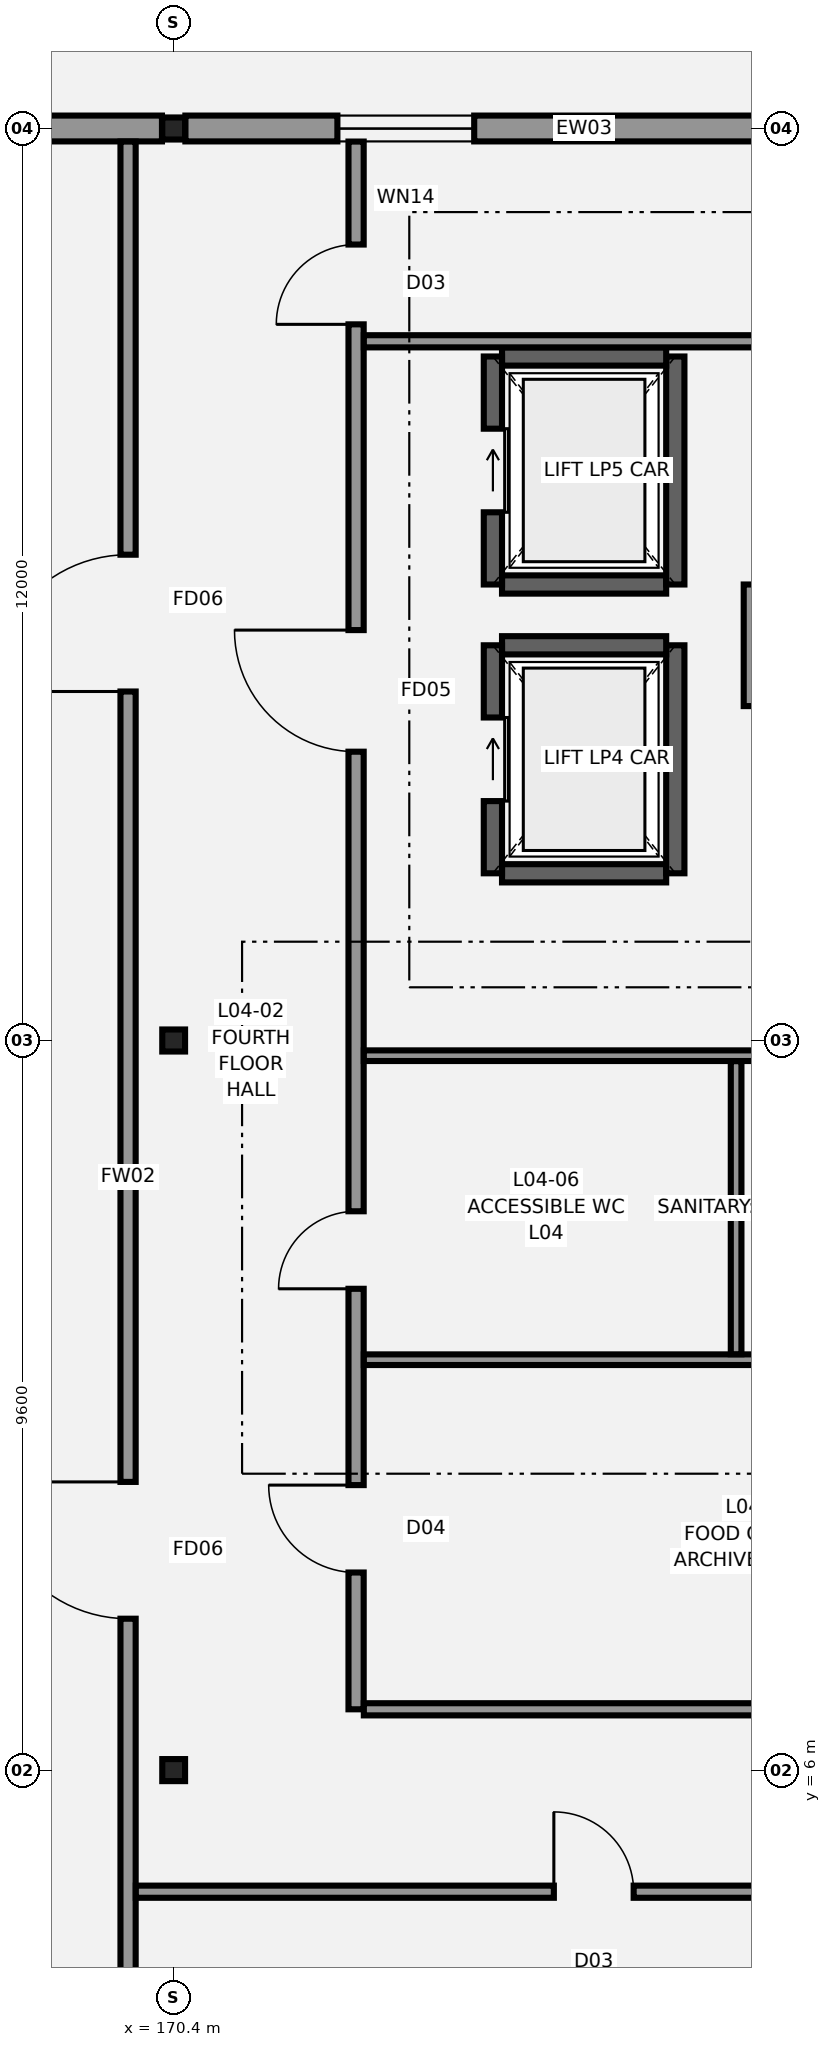
"""IFC4 building model, lengths in metres.
Left out: names, types, materials, properties, quantities, classifications, styles, units other than length and angle.
Written with IfcOpenShell. Run it as: python <this file> out.ifc"""

import sys

from ifc_helpers import new_model, si_unit, direction, frame, frame_2d, origin, origin_2d, place, context, subcontext, project, spatial, rectangle, i_section, extrude, element, fill, save


model = new_model("IFC4")
c1 = context("Model", 3, precision=1e-05, world=origin(), true_north=direction((0.0, 1.0)))
c2 = subcontext(c1, "Body", "Model", "MODEL_VIEW")
j1 = project(units=[si_unit("LENGTHUNIT", "METRE"), si_unit("PLANEANGLEUNIT", "RADIAN")], contexts=[c1])
p1 = place(None, origin())
s1 = spatial("IfcSite", under=j1, at=p1, CompositionType="ELEMENT")
p2 = place(p1, origin())
s2 = spatial("IfcBuilding", under=s1, at=p2, CompositionType="ELEMENT")
p3 = place(p2, frame((0.0, 0.0, 18.6)))
s3 = spatial("IfcBuildingStorey", under=s2, at=p3, CompositionType="ELEMENT", Elevation=18.6)
for number, where, z_axis, x_axis in (
    (1, (170.4, 6.0, 0.0), (0.0, 0.0, 1.0), (1.0, 0.0, 0.0)),
    (2, (170.4, 15.6, 0.0), (0.0, 0.0, 1.0), (1.0, 0.0, 0.0)),
    (3, (170.4, 27.6, 0.0), (0.0, 0.0, 1.0), (1.0, 0.0, 0.0)),
):
    element("IfcColumn", number, at=place(p3, frame(where, z_axis=z_axis, x_axis=x_axis)), inside=s3, PredefinedType="COLUMN", context=c2, shape_type="SweptSolid", body=[
        extrude(i_section(OverallWidth=0.3, OverallDepth=0.29, WebThickness=0.009, FlangeThickness=0.014, FilletRadius=0.027, at=origin_2d()), origin(), (0.0, 0.0, 1.0), 2.9),
    ])
p4 = place(p3, frame((174.72, 17.8, 0.0), z_axis=(0.0, 0.0, 1.0), x_axis=(1.0, 0.0, 0.0)))
e4 = element("IfcWall", 4, at=p4, inside=s3, PredefinedType="SHEAR", context=c2, shape_type="SweptSolid", body=[
    extrude(rectangle(XDim=2.16, YDim=0.24, at=frame_2d((1.08, 0.0))), origin(), (0.0, 0.0, 1.0), 2.7),
])
p5 = place(p3, frame((177.0, 17.8, 0.0), z_axis=(0.0, 0.0, 1.0), x_axis=(0.0, 1.0, 0.0)))
e5 = element("IfcWall", 5, at=p5, inside=s3, PredefinedType="SHEAR", context=c2, shape_type="SweptSolid", body=[
    extrude(rectangle(XDim=3.0, YDim=0.24, at=frame_2d((1.5, 0.0))), origin(), (0.0, 0.0, 1.0), 2.7),
])
p6 = place(p3, frame((176.88, 20.8, 0.0), z_axis=(0.0, 0.0, 1.0), x_axis=(-1.0, 0.0, 0.0)))
e6 = element("IfcWall", 6, at=p6, inside=s3, PredefinedType="SHEAR", context=c2, shape_type="SweptSolid", body=[
    extrude(rectangle(XDim=2.16, YDim=0.24, at=frame_2d((1.08, 0.0))), origin(), (0.0, 0.0, 1.0), 2.7),
])
p7 = place(p3, frame((174.6, 20.8, 0.0), z_axis=(0.0, 0.0, 1.0), x_axis=(0.0, -1.0, 0.0)))
e7 = element("IfcWall", 7, at=p7, inside=s3, PredefinedType="SHEAR", context=c2, shape_type="SweptSolid", body=[
    extrude(rectangle(XDim=3.0, YDim=0.24, at=frame_2d((1.5, 0.0))), origin(), (0.0, 0.0, 1.0), 2.7),
])
p8 = place(p7, frame((0.95, 0.0, 0.0)))
e8 = element("IfcOpeningElement", 8, at=p8, cuts=e7, PredefinedType="OPENING", context=c2, shape_type="SweptSolid", body=[
    extrude(rectangle(XDim=1.1, YDim=2.1, at=frame_2d((0.55, 1.05))), frame((0.0, 0.13, 0.0), z_axis=(0.0, -1.0, 0.0), x_axis=(1.0, 0.0, 0.0)), (0.0, 0.0, 1.0), 0.26),
])
p9 = place(p3, frame((174.72, 21.6, 0.0), z_axis=(0.0, 0.0, 1.0), x_axis=(1.0, 0.0, 0.0)))
e9 = element("IfcWall", 9, at=p9, inside=s3, PredefinedType="SHEAR", context=c2, shape_type="SweptSolid", body=[
    extrude(rectangle(XDim=2.16, YDim=0.24, at=frame_2d((1.08, 0.0))), origin(), (0.0, 0.0, 1.0), 2.7),
])
p10 = place(p3, frame((177.0, 21.6, 0.0), z_axis=(0.0, 0.0, 1.0), x_axis=(0.0, 1.0, 0.0)))
e10 = element("IfcWall", 10, at=p10, inside=s3, PredefinedType="SHEAR", context=c2, shape_type="SweptSolid", body=[
    extrude(rectangle(XDim=3.0, YDim=0.24, at=frame_2d((1.5, 0.0))), origin(), (0.0, 0.0, 1.0), 2.7),
])
p11 = place(p3, frame((176.88, 24.6, 0.0), z_axis=(0.0, 0.0, 1.0), x_axis=(-1.0, 0.0, 0.0)))
e11 = element("IfcWall", 11, at=p11, inside=s3, PredefinedType="SHEAR", context=c2, shape_type="SweptSolid", body=[
    extrude(rectangle(XDim=2.16, YDim=0.24, at=frame_2d((1.08, 0.0))), origin(), (0.0, 0.0, 1.0), 2.7),
])
p12 = place(p3, frame((174.6, 24.6, 0.0), z_axis=(0.0, 0.0, 1.0), x_axis=(0.0, -1.0, 0.0)))
e12 = element("IfcWall", 12, at=p12, inside=s3, PredefinedType="SHEAR", context=c2, shape_type="SweptSolid", body=[
    extrude(rectangle(XDim=3.0, YDim=0.24, at=frame_2d((1.5, 0.0))), origin(), (0.0, 0.0, 1.0), 2.7),
])
p13 = place(p12, frame((0.95, 0.0, 0.0)))
e13 = element("IfcOpeningElement", 13, at=p13, cuts=e12, PredefinedType="OPENING", context=c2, shape_type="SweptSolid", body=[
    extrude(rectangle(XDim=1.1, YDim=2.1, at=frame_2d((0.55, 1.05))), frame((0.0, 0.13, 0.0), z_axis=(0.0, -1.0, 0.0), x_axis=(1.0, 0.0, 0.0)), (0.0, 0.0, 1.0), 0.26),
])
p14 = place(p3, frame((159.754, 27.6, 0.0), z_axis=(0.0, 0.0, 1.0), x_axis=(1.0, 0.0, 0.0)))
e14 = element("IfcWall", 14, at=p14, inside=s3, PredefinedType="STANDARD", context=c2, shape_type="SweptSolid", body=[
    extrude(rectangle(XDim=10.492, YDim=0.34, at=frame_2d((5.246, 0.0))), origin(), (0.0, 0.0, 1.0), 2.45),
])
p15 = place(p14, frame((2.6, 0.0, 0.0)))
e15 = element("IfcOpeningElement", 15, at=p15, cuts=e14, PredefinedType="OPENING", context=c2, shape_type="SweptSolid", body=[
    extrude(rectangle(XDim=1.5, YDim=2.3, at=frame_2d((0.75, 1.15))), frame((0.0, 0.18, 0.0), z_axis=(0.0, -1.0, 0.0), x_axis=(1.0, 0.0, 0.0)), (0.0, 0.0, 1.0), 0.36),
])
p16 = place(p3, frame((170.554, 27.6, 0.0), z_axis=(0.0, 0.0, 1.0), x_axis=(1.0, 0.0, 0.0)))
e16 = element("IfcWall", 16, at=p16, inside=s3, PredefinedType="STANDARD", context=c2, shape_type="SweptSolid", body=[
    extrude(rectangle(XDim=10.492, YDim=0.34, at=frame_2d((5.246, 0.0))), origin(), (0.0, 0.0, 1.0), 2.45),
])
p17 = place(p16, frame((2.0, 0.0, 0.8)))
e17 = element("IfcOpeningElement", 17, at=p17, cuts=e16, PredefinedType="OPENING", context=c2, shape_type="SweptSolid", body=[
    extrude(rectangle(XDim=1.8, YDim=1.4, at=frame_2d((0.9, 0.7))), frame((0.0, 0.18, 0.0), z_axis=(0.0, -1.0, 0.0), x_axis=(1.0, 0.0, 0.0)), (0.0, 0.0, 1.0), 0.36),
])
p18 = place(p3, frame((169.8, 0.192, 0.0), z_axis=(0.0, 0.0, 1.0), x_axis=(0.0, 1.0, 0.0)))
e18 = element("IfcWall", 18, at=p18, inside=s3, PredefinedType="PARTITIONING", context=c2, shape_type="SweptSolid", body=[
    extrude(rectangle(XDim=27.236, YDim=0.2, at=frame_2d((13.618, 0.0))), origin(), (0.0, 0.0, 1.0), 2.45),
])
p19 = place(p18, frame((7.8, 0.0, 0.0)))
e19 = element("IfcOpeningElement", 19, at=p19, cuts=e18, PredefinedType="OPENING", context=c2, shape_type="SweptSolid", body=[
    extrude(rectangle(XDim=1.8, YDim=2.2, at=frame_2d((0.9, 1.1))), frame((0.0, 0.11, 0.0), z_axis=(0.0, -1.0, 0.0), x_axis=(1.0, 0.0, 0.0)), (0.0, 0.0, 1.0), 0.22),
])
p20 = place(p18, frame((20.0, 0.0, 0.0)))
e20 = element("IfcOpeningElement", 20, at=p20, cuts=e18, PredefinedType="OPENING", context=c2, shape_type="SweptSolid", body=[
    extrude(rectangle(XDim=1.8, YDim=2.2, at=frame_2d((0.9, 1.1))), frame((0.0, 0.11, 0.0), z_axis=(0.0, -1.0, 0.0), x_axis=(1.0, 0.0, 0.0)), (0.0, 0.0, 1.0), 0.22),
])
p21 = place(p3, frame((169.902, 4.4, 0.0), z_axis=(0.0, 0.0, 1.0), x_axis=(1.0, 0.0, 0.0)))
e21 = element("IfcWall", 21, at=p21, inside=s3, PredefinedType="PARTITIONING", context=c2, shape_type="SweptSolid", body=[
    extrude(rectangle(XDim=17.616, YDim=0.16, at=frame_2d((8.808, 0.0))), origin(), (0.0, 0.0, 1.0), 2.45),
])
p22 = place(p21, frame((5.5, 0.0, 0.0)))
e22 = element("IfcOpeningElement", 22, at=p22, cuts=e21, PredefinedType="OPENING", context=c2, shape_type="SweptSolid", body=[
    extrude(rectangle(XDim=1.05, YDim=2.15, at=frame_2d((0.525, 1.075))), frame((0.0, 0.09, 0.0), z_axis=(0.0, -1.0, 0.0), x_axis=(1.0, 0.0, 0.0)), (0.0, 0.0, 1.0), 0.18),
])
p23 = place(p3, frame((172.8, 6.8, 0.0), z_axis=(0.0, 0.0, 1.0), x_axis=(0.0, 1.0, 0.0)))
e23 = element("IfcWall", 23, at=p23, inside=s3, PredefinedType="PARTITIONING", context=c2, shape_type="SweptSolid", body=[
    extrude(rectangle(XDim=20.628, YDim=0.2, at=frame_2d((10.314, 0.0))), origin(), (0.0, 0.0, 1.0), 2.45),
])
p24 = place(p23, frame((1.8, 0.0, 0.0)))
e24 = element("IfcOpeningElement", 24, at=p24, cuts=e23, PredefinedType="OPENING", context=c2, shape_type="SweptSolid", body=[
    extrude(rectangle(XDim=1.15, YDim=2.15, at=frame_2d((0.575, 1.075))), frame((0.0, 0.11, 0.0), z_axis=(0.0, -1.0, 0.0), x_axis=(1.0, 0.0, 0.0)), (0.0, 0.0, 1.0), 0.22),
])
p25 = place(p23, frame((5.533, 0.0, 0.0)))
e25 = element("IfcOpeningElement", 25, at=p25, cuts=e23, PredefinedType="OPENING", context=c2, shape_type="SweptSolid", body=[
    extrude(rectangle(XDim=1.02, YDim=2.12, at=frame_2d((0.51, 1.06))), frame((0.0, 0.11, 0.0), z_axis=(0.0, -1.0, 0.0), x_axis=(1.0, 0.0, 0.0)), (0.0, 0.0, 1.0), 0.22),
])
p26 = place(p23, frame((12.6, 0.0, 0.0)))
e26 = element("IfcOpeningElement", 26, at=p26, cuts=e23, PredefinedType="OPENING", context=c2, shape_type="SweptSolid", body=[
    extrude(rectangle(XDim=1.6, YDim=2.2, at=frame_2d((0.8, 1.1))), frame((0.0, 0.11, 0.0), z_axis=(0.0, -1.0, 0.0), x_axis=(1.0, 0.0, 0.0)), (0.0, 0.0, 1.0), 0.22),
])
p27 = place(p23, frame((18.223, 0.0, 0.0)))
e27 = element("IfcOpeningElement", 27, at=p27, cuts=e23, PredefinedType="OPENING", context=c2, shape_type="SweptSolid", body=[
    extrude(rectangle(XDim=1.05, YDim=2.15, at=frame_2d((0.525, 1.075))), frame((0.0, 0.11, 0.0), z_axis=(0.0, -1.0, 0.0), x_axis=(1.0, 0.0, 0.0)), (0.0, 0.0, 1.0), 0.22),
])
p28 = place(p3, frame((172.902, 6.8, 0.0), z_axis=(0.0, 0.0, 1.0), x_axis=(1.0, 0.0, 0.0)))
e28 = element("IfcWall", 28, at=p28, inside=s3, PredefinedType="PARTITIONING", context=c2, shape_type="SweptSolid", body=[
    extrude(rectangle(XDim=10.346, YDim=0.16, at=frame_2d((5.173, 0.0))), origin(), (0.0, 0.0, 1.0), 2.45),
])
p29 = place(p3, frame((172.902, 11.4, 0.0), z_axis=(0.0, 0.0, 1.0), x_axis=(1.0, 0.0, 0.0)))
e29 = element("IfcWall", 29, at=p29, inside=s3, PredefinedType="PARTITIONING", context=c2, shape_type="SweptSolid", body=[
    extrude(rectangle(XDim=10.346, YDim=0.14, at=frame_2d((5.173, 0.0))), origin(), (0.0, 0.0, 1.0), 2.45),
])
p30 = place(p3, frame((172.902, 15.4, 0.0), z_axis=(0.0, 0.0, 1.0), x_axis=(1.0, 0.0, 0.0)))
e30 = element("IfcWall", 30, at=p30, inside=s3, PredefinedType="PARTITIONING", context=c2, shape_type="SweptSolid", body=[
    extrude(rectangle(XDim=14.616, YDim=0.14, at=frame_2d((7.308, 0.0))), origin(), (0.0, 0.0, 1.0), 2.45),
])
p31 = place(p30, frame((6.0, 0.0, 0.0)))
e31 = element("IfcOpeningElement", 31, at=p31, cuts=e30, PredefinedType="OPENING", context=c2, shape_type="SweptSolid", body=[
    extrude(rectangle(XDim=0.95, YDim=2.1, at=frame_2d((0.475, 1.05))), frame((0.0, 0.08, 0.0), z_axis=(0.0, -1.0, 0.0), x_axis=(1.0, 0.0, 0.0)), (0.0, 0.0, 1.0), 0.16),
])
p32 = place(p3, frame((177.8, 11.472, 0.0), z_axis=(0.0, 0.0, 1.0), x_axis=(0.0, 1.0, 0.0)))
e32 = element("IfcWall", 32, at=p32, inside=s3, PredefinedType="PARTITIONING", context=c2, shape_type="SweptSolid", body=[
    extrude(rectangle(XDim=3.856, YDim=0.14, at=frame_2d((1.928, 0.0))), origin(), (0.0, 0.0, 1.0), 2.45),
])
p33 = place(p3, frame((172.902, 24.8, 0.0), z_axis=(0.0, 0.0, 1.0), x_axis=(1.0, 0.0, 0.0)))
e33 = element("IfcWall", 33, at=p33, inside=s3, PredefinedType="PARTITIONING", context=c2, shape_type="SweptSolid", body=[
    extrude(rectangle(XDim=14.616, YDim=0.16, at=frame_2d((7.308, 0.0))), origin(), (0.0, 0.0, 1.0), 2.45),
])
p34 = place(p3, frame((178.0, 21.6, 0.0), z_axis=(0.0, 0.0, 1.0), x_axis=(0.0, -1.0, 0.0)))
e34 = element("IfcWall", 34, at=p34, inside=s3, PredefinedType="PARTITIONING", context=c2, shape_type="SweptSolid", body=[
    extrude(rectangle(XDim=1.6, YDim=0.2, at=frame_2d((0.8, 0.0))), origin(), (0.0, 0.0, 1.0), 2.45),
])
p35 = place(p17, origin())
e35 = element("IfcWindow", 35, at=p35, inside=s3, PartitioningType="SINGLE_PANEL", PredefinedType="WINDOW", context=c2, shape_type="SweptSolid", body=[
    extrude(rectangle(XDim=1.8, YDim=1.4, at=frame_2d((0.9, 0.7))), frame((0.0, 0.03, 0.0), z_axis=(0.0, -1.0, 0.0), x_axis=(1.0, 0.0, 0.0)), (0.0, 0.0, 1.0), 0.06),
])
fill(e17, e35)
p36 = place(p19, origin())
e36 = element("IfcDoor", 36, at=p36, inside=s3, OperationType="SINGLE_SWING_RIGHT", PredefinedType="DOOR", context=c2, shape_type="SweptSolid", body=[
    extrude(rectangle(XDim=1.8, YDim=2.2, at=frame_2d((0.9, 1.1))), frame((0.0, 0.025, 0.0), z_axis=(0.0, -1.0, 0.0), x_axis=(1.0, 0.0, 0.0)), (0.0, 0.0, 1.0), 0.05),
])
fill(e19, e36)
p37 = place(p20, origin())
e37 = element("IfcDoor", 37, at=p37, inside=s3, OperationType="SINGLE_SWING_LEFT", PredefinedType="DOOR", context=c2, shape_type="SweptSolid", body=[
    extrude(rectangle(XDim=1.8, YDim=2.2, at=frame_2d((0.9, 1.1))), frame((0.0, 0.025, 0.0), z_axis=(0.0, -1.0, 0.0), x_axis=(1.0, 0.0, 0.0)), (0.0, 0.0, 1.0), 0.05),
])
fill(e20, e37)
p38 = place(p22, origin())
e38 = element("IfcDoor", 38, at=p38, inside=s3, OperationType="SINGLE_SWING_LEFT", PredefinedType="DOOR", context=c2, shape_type="SweptSolid", body=[
    extrude(rectangle(XDim=1.05, YDim=2.15, at=frame_2d((0.525, 1.075))), frame((0.0, 0.025, 0.0), z_axis=(0.0, -1.0, 0.0), x_axis=(1.0, 0.0, 0.0)), (0.0, 0.0, 1.0), 0.05),
])
fill(e22, e38)
p39 = place(p24, origin())
e39 = element("IfcDoor", 39, at=p39, inside=s3, OperationType="SINGLE_SWING_RIGHT", PredefinedType="DOOR", context=c2, shape_type="SweptSolid", body=[
    extrude(rectangle(XDim=1.15, YDim=2.15, at=frame_2d((0.575, 1.075))), frame((0.0, 0.025, 0.0), z_axis=(0.0, -1.0, 0.0), x_axis=(1.0, 0.0, 0.0)), (0.0, 0.0, 1.0), 0.05),
])
fill(e24, e39)
p40 = place(p25, origin())
e40 = element("IfcDoor", 40, at=p40, inside=s3, OperationType="SINGLE_SWING_LEFT", PredefinedType="DOOR", context=c2, shape_type="SweptSolid", body=[
    extrude(rectangle(XDim=1.02, YDim=2.12, at=frame_2d((0.51, 1.06))), frame((0.0, 0.025, 0.0), z_axis=(0.0, -1.0, 0.0), x_axis=(1.0, 0.0, 0.0)), (0.0, 0.0, 1.0), 0.05),
])
fill(e25, e40)
p41 = place(p26, origin())
e41 = element("IfcDoor", 41, at=p41, inside=s3, OperationType="SINGLE_SWING_RIGHT", PredefinedType="DOOR", context=c2, shape_type="SweptSolid", body=[
    extrude(rectangle(XDim=1.6, YDim=2.2, at=frame_2d((0.8, 1.1))), frame((0.0, 0.025, 0.0), z_axis=(0.0, -1.0, 0.0), x_axis=(1.0, 0.0, 0.0)), (0.0, 0.0, 1.0), 0.05),
])
fill(e26, e41)
p42 = place(p27, origin())
e42 = element("IfcDoor", 42, at=p42, inside=s3, OperationType="SINGLE_SWING_LEFT", PredefinedType="DOOR", context=c2, shape_type="SweptSolid", body=[
    extrude(rectangle(XDim=1.05, YDim=2.15, at=frame_2d((0.525, 1.075))), frame((0.0, 0.025, 0.0), z_axis=(0.0, -1.0, 0.0), x_axis=(1.0, 0.0, 0.0)), (0.0, 0.0, 1.0), 0.05),
])
fill(e27, e42)
p43 = place(p8, origin())
e43 = element("IfcDoor", 43, at=p43, inside=s3, OperationType="SLIDING_TO_LEFT", PredefinedType="DOOR", context=c2, shape_type="SweptSolid", body=[
    extrude(rectangle(XDim=1.1, YDim=2.1, at=frame_2d((0.55, 1.05))), frame((0.0, 0.025, 0.0), z_axis=(0.0, -1.0, 0.0), x_axis=(1.0, 0.0, 0.0)), (0.0, 0.0, 1.0), 0.05),
])
fill(e8, e43)
p44 = place(p13, origin())
e44 = element("IfcDoor", 44, at=p44, inside=s3, OperationType="SLIDING_TO_LEFT", PredefinedType="DOOR", context=c2, shape_type="SweptSolid", body=[
    extrude(rectangle(XDim=1.1, YDim=2.1, at=frame_2d((0.55, 1.05))), frame((0.0, 0.025, 0.0), z_axis=(0.0, -1.0, 0.0), x_axis=(1.0, 0.0, 0.0)), (0.0, 0.0, 1.0), 0.05),
])
fill(e13, e44)
save(model, sys.argv[1])
